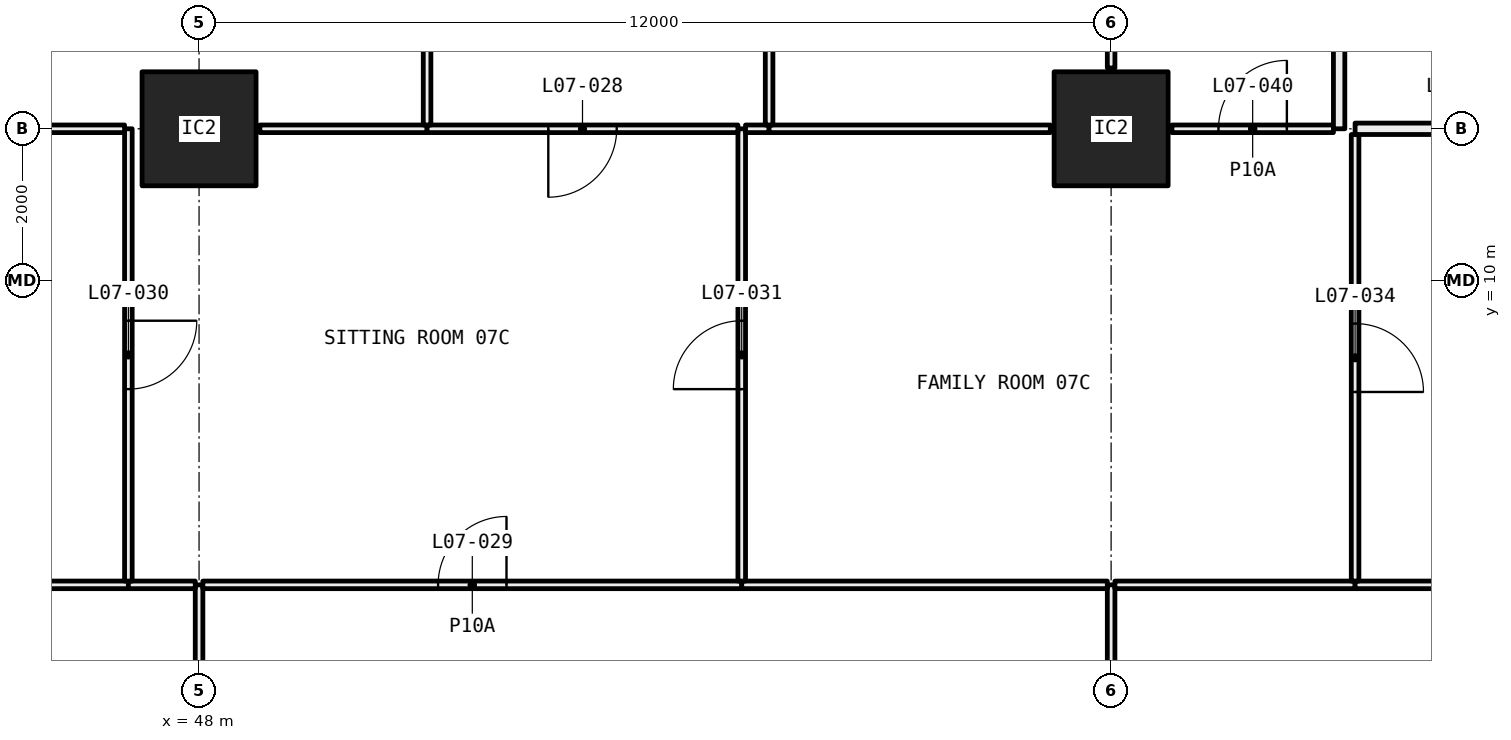
"""IFC4 building model, lengths in metres.
Left out: names, types, materials, properties, quantities, classifications, styles, units other than length and angle.
Written with IfcOpenShell. Run it as: python <this file> out.ifc"""

import sys

from ifc_helpers import new_model, si_unit, direction, frame, frame_2d, origin, origin_2d, place, context, subcontext, project, spatial, rectangle, hollow_rectangle, extrude, element, fill, save


model = new_model("IFC4")
c1 = context("Model", 3, precision=1e-05, world=origin(), true_north=direction((0.0, 1.0)))
c2 = subcontext(c1, "Body", "Model", "MODEL_VIEW")
j1 = project(units=[si_unit("LENGTHUNIT", "METRE"), si_unit("PLANEANGLEUNIT", "RADIAN")], contexts=[c1])
p1 = place(None, origin())
s1 = spatial("IfcSite", under=j1, at=p1, CompositionType="ELEMENT")
p2 = place(p1, origin())
s2 = spatial("IfcBuilding", under=s1, at=p2, CompositionType="ELEMENT")
p3 = place(p2, frame((0.0, 0.0, 36.9)))
s3 = spatial("IfcBuildingStorey", under=s2, at=p3, CompositionType="ELEMENT", Elevation=36.9)
for number, where, z_axis, x_axis in (
    (1, (48.0, 12.0, 0.0), (0.0, 0.0, 1.0), (1.0, 0.0, 0.0)),
    (2, (60.0, 12.0, 0.0), (0.0, 0.0, 1.0), (1.0, 0.0, 0.0)),
):
    element("IfcColumn", number, at=place(p3, frame(where, z_axis=z_axis, x_axis=x_axis)), inside=s3, PredefinedType="COLUMN", context=c2, shape_type="SweptSolid", body=[
        extrude(hollow_rectangle(XDim=1.5, YDim=1.5, WallThickness=0.065, at=origin_2d()), origin(), (0.0, 0.0, 1.0), 3.05),
    ])
p4 = place(p3, frame((48.0, 0.72, 0.0), z_axis=(0.0, 0.0, 1.0), x_axis=(0.0, 1.0, 0.0)))
e3 = element("IfcWall", 3, at=p4, inside=s3, PredefinedType="PARTITIONING", context=c2, shape_type="SweptSolid", body=[
    extrude(rectangle(XDim=5.28, YDim=0.1, at=frame_2d((2.64, 0.0))), origin(), (0.0, 0.0, 1.0), 2.45),
])
p5 = place(p4, frame((2.19, 0.0, 0.0)))
e4 = element("IfcOpeningElement", 4, at=p5, cuts=e3, PredefinedType="OPENING", context=c2, shape_type="SweptSolid", body=[
    extrude(rectangle(XDim=0.9, YDim=2.1, at=frame_2d((0.45, 1.05))), frame((0.0, 0.06, 0.0), z_axis=(0.0, -1.0, 0.0), x_axis=(1.0, 0.0, 0.0)), (0.0, 0.0, 1.0), 0.12),
])
p6 = place(p3, frame((47.07, 6.0, 0.0), z_axis=(0.0, 0.0, 1.0), x_axis=(-1.0, 0.0, 0.0)))
e5 = element("IfcWall", 5, at=p6, inside=s3, PredefinedType="PARTITIONING", context=c2, shape_type="SweptSolid", body=[
    extrude(rectangle(XDim=5.02, YDim=0.1, at=frame_2d((2.51, 0.0))), origin(), (0.0, 0.0, 1.0), 3.05),
])
p7 = place(p3, frame((47.95, 6.0, 0.0), z_axis=(0.0, 0.0, 1.0), x_axis=(-1.0, 0.0, 0.0)))
e6 = element("IfcWall", 6, at=p7, inside=s3, PredefinedType="PARTITIONING", context=c2, shape_type="SweptSolid", body=[
    extrude(rectangle(XDim=0.88, YDim=0.1, at=frame_2d((0.44, 0.0))), origin(), (0.0, 0.0, 1.0), 2.45),
])
p8 = place(p3, frame((60.0, 0.72, 0.0), z_axis=(0.0, 0.0, 1.0), x_axis=(0.0, 1.0, 0.0)))
e7 = element("IfcWall", 7, at=p8, inside=s3, PredefinedType="PARTITIONING", context=c2, shape_type="SweptSolid", body=[
    extrude(rectangle(XDim=5.28, YDim=0.1, at=frame_2d((2.64, 0.0))), origin(), (0.0, 0.0, 1.0), 2.45),
])
p9 = place(p8, frame((2.19, 0.0, 0.0)))
e8 = element("IfcOpeningElement", 8, at=p9, cuts=e7, PredefinedType="OPENING", context=c2, shape_type="SweptSolid", body=[
    extrude(rectangle(XDim=0.9, YDim=2.1, at=frame_2d((0.45, 1.05))), frame((0.0, 0.06, 0.0), z_axis=(0.0, -1.0, 0.0), x_axis=(1.0, 0.0, 0.0)), (0.0, 0.0, 1.0), 0.12),
])
p10 = place(p3, frame((55.14, 6.0, 0.0), z_axis=(0.0, 0.0, 1.0), x_axis=(-1.0, 0.0, 0.0)))
e9 = element("IfcWall", 9, at=p10, inside=s3, PredefinedType="PARTITIONING", context=c2, shape_type="SweptSolid", body=[
    extrude(rectangle(XDim=7.09, YDim=0.1, at=frame_2d((3.545, 0.0))), origin(), (0.0, 0.0, 1.0), 2.45),
])
p11 = place(p10, frame((3.095, 0.0, 0.0)))
e10 = element("IfcOpeningElement", 10, at=p11, cuts=e9, PredefinedType="OPENING", context=c2, shape_type="SweptSolid", body=[
    extrude(rectangle(XDim=0.9, YDim=2.1, at=frame_2d((0.45, 1.05))), frame((0.0, 0.06, 0.0), z_axis=(0.0, -1.0, 0.0), x_axis=(1.0, 0.0, 0.0)), (0.0, 0.0, 1.0), 0.12),
])
p12 = place(p3, frame((59.95, 6.0, 0.0), z_axis=(0.0, 0.0, 1.0), x_axis=(-1.0, 0.0, 0.0)))
e11 = element("IfcWall", 11, at=p12, inside=s3, PredefinedType="PARTITIONING", context=c2, shape_type="SweptSolid", body=[
    extrude(rectangle(XDim=4.81, YDim=0.1, at=frame_2d((2.405, 0.0))), origin(), (0.0, 0.0, 1.0), 2.45),
])
p13 = place(p3, frame((63.21, 6.0, 0.0), z_axis=(0.0, 0.0, 1.0), x_axis=(-1.0, 0.0, 0.0)))
e12 = element("IfcWall", 12, at=p13, inside=s3, PredefinedType="PARTITIONING", context=c2, shape_type="SweptSolid", body=[
    extrude(rectangle(XDim=3.16, YDim=0.1, at=frame_2d((1.58, 0.0))), origin(), (0.0, 0.0, 1.0), 2.45),
])
p14 = place(p3, frame((65.28, 6.0, 0.0), z_axis=(0.0, 0.0, 1.0), x_axis=(-1.0, 0.0, 0.0)))
e13 = element("IfcWall", 13, at=p14, inside=s3, PredefinedType="PARTITIONING", context=c2, shape_type="SweptSolid", body=[
    extrude(rectangle(XDim=2.07, YDim=0.1, at=frame_2d((1.035, 0.0))), origin(), (0.0, 0.0, 1.0), 3.05),
])
p15 = place(p3, frame((47.07, 6.05, 0.0), z_axis=(0.0, 0.0, 1.0), x_axis=(0.0, 1.0, 0.0)))
e14 = element("IfcWall", 14, at=p15, inside=s3, PredefinedType="PARTITIONING", context=c2, shape_type="SweptSolid", body=[
    extrude(rectangle(XDim=5.95, YDim=0.1, at=frame_2d((2.975, 0.0))), origin(), (0.0, 0.0, 1.0), 2.45),
])
p16 = place(p15, frame((2.525, 0.0, 0.0)))
e15 = element("IfcOpeningElement", 15, at=p16, cuts=e14, PredefinedType="OPENING", context=c2, shape_type="SweptSolid", body=[
    extrude(rectangle(XDim=0.9, YDim=2.1, at=frame_2d((0.45, 1.05))), frame((0.0, 0.06, 0.0), z_axis=(0.0, -1.0, 0.0), x_axis=(1.0, 0.0, 0.0)), (0.0, 0.0, 1.0), 0.12),
])
p17 = place(p3, frame((47.02, 12.0, 0.0), z_axis=(0.0, 0.0, 1.0), x_axis=(-1.0, 0.0, 0.0)))
e16 = element("IfcWall", 16, at=p17, inside=s3, PredefinedType="PARTITIONING", context=c2, shape_type="SweptSolid", body=[
    extrude(rectangle(XDim=3.52, YDim=0.1, at=frame_2d((1.76, 0.0))), origin(), (0.0, 0.0, 1.0), 2.45),
])
p18 = place(p3, frame((55.14, 6.05, 0.0), z_axis=(0.0, 0.0, 1.0), x_axis=(0.0, 1.0, 0.0)))
e17 = element("IfcWall", 17, at=p18, inside=s3, PredefinedType="PARTITIONING", context=c2, shape_type="SweptSolid", body=[
    extrude(rectangle(XDim=5.95, YDim=0.1, at=frame_2d((2.975, 0.0))), origin(), (0.0, 0.0, 1.0), 2.45),
])
p19 = place(p18, frame((2.525, 0.0, 0.0)))
e18 = element("IfcOpeningElement", 18, at=p19, cuts=e17, PredefinedType="OPENING", context=c2, shape_type="SweptSolid", body=[
    extrude(rectangle(XDim=0.9, YDim=2.1, at=frame_2d((0.45, 1.05))), frame((0.0, 0.06, 0.0), z_axis=(0.0, -1.0, 0.0), x_axis=(1.0, 0.0, 0.0)), (0.0, 0.0, 1.0), 0.12),
])
p20 = place(p3, frame((51.0, 12.0, 0.0), z_axis=(0.0, 0.0, 1.0), x_axis=(-1.0, 0.0, 0.0)))
e19 = element("IfcWall", 19, at=p20, inside=s3, PredefinedType="PARTITIONING", context=c2, shape_type="SweptSolid", body=[
    extrude(rectangle(XDim=2.2, YDim=0.1, at=frame_2d((1.1, 0.0))), origin(), (0.0, 0.0, 1.0), 2.45),
])
p21 = place(p3, frame((55.09, 12.0, 0.0), z_axis=(0.0, 0.0, 1.0), x_axis=(-1.0, 0.0, 0.0)))
e20 = element("IfcWall", 20, at=p21, inside=s3, PredefinedType="PARTITIONING", context=c2, shape_type="SweptSolid", body=[
    extrude(rectangle(XDim=4.09, YDim=0.1, at=frame_2d((2.045, 0.0))), origin(), (0.0, 0.0, 1.0), 2.45),
])
p22 = place(p21, frame((1.595, 0.0, 0.0)))
e21 = element("IfcOpeningElement", 21, at=p22, cuts=e20, PredefinedType="OPENING", context=c2, shape_type="SweptSolid", body=[
    extrude(rectangle(XDim=0.9, YDim=2.1, at=frame_2d((0.45, 1.05))), frame((0.0, 0.06, 0.0), z_axis=(0.0, -1.0, 0.0), x_axis=(1.0, 0.0, 0.0)), (0.0, 0.0, 1.0), 0.12),
])
p23 = place(p3, frame((63.21, 6.05, 0.0), z_axis=(0.0, 0.0, 1.0), x_axis=(0.0, 1.0, 0.0)))
e22 = element("IfcWall", 22, at=p23, inside=s3, PredefinedType="PARTITIONING", context=c2, shape_type="SweptSolid", body=[
    extrude(rectangle(XDim=5.875, YDim=0.1, at=frame_2d((2.938, 0.0))), origin(), (0.0, 0.0, 1.0), 2.45),
])
p24 = place(p23, frame((2.488, 0.0, 0.0)))
e23 = element("IfcOpeningElement", 23, at=p24, cuts=e22, PredefinedType="OPENING", context=c2, shape_type="SweptSolid", body=[
    extrude(rectangle(XDim=0.9, YDim=2.1, at=frame_2d((0.45, 1.05))), frame((0.0, 0.06, 0.0), z_axis=(0.0, -1.0, 0.0), x_axis=(1.0, 0.0, 0.0)), (0.0, 0.0, 1.0), 0.12),
])
p25 = place(p3, frame((55.5, 12.0, 0.0), z_axis=(0.0, 0.0, 1.0), x_axis=(-1.0, 0.0, 0.0)))
e24 = element("IfcWall", 24, at=p25, inside=s3, PredefinedType="PARTITIONING", context=c2, shape_type="SweptSolid", body=[
    extrude(rectangle(XDim=0.31, YDim=0.1, at=frame_2d((0.155, 0.0))), origin(), (0.0, 0.0, 1.0), 2.45),
])
p26 = place(p3, frame((59.2, 12.0, 0.0), z_axis=(0.0, 0.0, 1.0), x_axis=(-1.0, 0.0, 0.0)))
e25 = element("IfcWall", 25, at=p26, inside=s3, PredefinedType="PARTITIONING", context=c2, shape_type="SweptSolid", body=[
    extrude(rectangle(XDim=3.7, YDim=0.1, at=frame_2d((1.85, 0.0))), origin(), (0.0, 0.0, 1.0), 2.45),
])
p27 = place(p3, frame((62.925, 12.0, 0.0), z_axis=(0.0, 0.0, 1.0), x_axis=(-1.0, 0.0, 0.0)))
e26 = element("IfcWall", 26, at=p27, inside=s3, PredefinedType="PARTITIONING", context=c2, shape_type="SweptSolid", body=[
    extrude(rectangle(XDim=2.125, YDim=0.1, at=frame_2d((1.062, 0.0))), origin(), (0.0, 0.0, 1.0), 2.45),
])
p28 = place(p27, frame((0.613, 0.0, 0.0)))
e27 = element("IfcOpeningElement", 27, at=p28, cuts=e26, PredefinedType="OPENING", context=c2, shape_type="SweptSolid", body=[
    extrude(rectangle(XDim=0.9, YDim=2.1, at=frame_2d((0.45, 1.05))), frame((0.0, 0.06, 0.0), z_axis=(0.0, -1.0, 0.0), x_axis=(1.0, 0.0, 0.0)), (0.0, 0.0, 1.0), 0.12),
])
p29 = place(p3, frame((66.146, 12.0, 0.0), z_axis=(0.0, 0.0, 1.0), x_axis=(-1.0, 0.0, 0.0)))
e28 = element("IfcWall", 28, at=p29, inside=s3, PredefinedType="PARTITIONING", context=c2, shape_type="SweptSolid", body=[
    extrude(rectangle(XDim=2.936, YDim=0.15, at=frame_2d((1.468, 0.0))), origin(), (0.0, 0.0, 1.0), 2.45),
])
p30 = place(p29, frame((1.018, 0.0, 0.0)))
e29 = element("IfcOpeningElement", 29, at=p30, cuts=e28, PredefinedType="OPENING", context=c2, shape_type="SweptSolid", body=[
    extrude(rectangle(XDim=0.9, YDim=2.1, at=frame_2d((0.45, 1.05))), frame((0.0, 0.085, 0.0), z_axis=(0.0, -1.0, 0.0), x_axis=(1.0, 0.0, 0.0)), (0.0, 0.0, 1.0), 0.17),
])
p31 = place(p3, frame((51.0, 12.05, 0.0), z_axis=(0.0, 0.0, 1.0), x_axis=(0.0, 1.0, 0.0)))
e30 = element("IfcWall", 30, at=p31, inside=s3, PredefinedType="PARTITIONING", context=c2, shape_type="SweptSolid", body=[
    extrude(rectangle(XDim=5.85, YDim=0.1, at=frame_2d((2.925, 0.0))), origin(), (0.0, 0.0, 1.0), 2.45),
])
p32 = place(p31, frame((2.475, 0.0, 0.0)))
e31 = element("IfcOpeningElement", 31, at=p32, cuts=e30, PredefinedType="OPENING", context=c2, shape_type="SweptSolid", body=[
    extrude(rectangle(XDim=0.9, YDim=2.1, at=frame_2d((0.45, 1.05))), frame((0.0, 0.06, 0.0), z_axis=(0.0, -1.0, 0.0), x_axis=(1.0, 0.0, 0.0)), (0.0, 0.0, 1.0), 0.12),
])
p33 = place(p3, frame((55.5, 12.05, 0.0), z_axis=(0.0, 0.0, 1.0), x_axis=(0.0, 1.0, 0.0)))
e32 = element("IfcWall", 32, at=p33, inside=s3, PredefinedType="PARTITIONING", context=c2, shape_type="SweptSolid", body=[
    extrude(rectangle(XDim=5.85, YDim=0.1, at=frame_2d((2.925, 0.0))), origin(), (0.0, 0.0, 1.0), 2.45),
])
p34 = place(p33, frame((2.475, 0.0, 0.0)))
e33 = element("IfcOpeningElement", 33, at=p34, cuts=e32, PredefinedType="OPENING", context=c2, shape_type="SweptSolid", body=[
    extrude(rectangle(XDim=0.9, YDim=2.1, at=frame_2d((0.45, 1.05))), frame((0.0, 0.06, 0.0), z_axis=(0.0, -1.0, 0.0), x_axis=(1.0, 0.0, 0.0)), (0.0, 0.0, 1.0), 0.12),
])
p35 = place(p3, frame((60.0, 12.8, 0.0), z_axis=(0.0, 0.0, 1.0), x_axis=(0.0, 1.0, 0.0)))
e34 = element("IfcWall", 34, at=p35, inside=s3, PredefinedType="PARTITIONING", context=c2, shape_type="SweptSolid", body=[
    extrude(rectangle(XDim=5.1, YDim=0.1, at=frame_2d((2.55, 0.0))), origin(), (0.0, 0.0, 1.0), 3.05),
])
p36 = place(p3, frame((63.0, 12.0, 0.0), z_axis=(0.0, 0.0, 1.0), x_axis=(0.0, 1.0, 0.0)))
e35 = element("IfcWall", 35, at=p36, inside=s3, PredefinedType="PARTITIONING", context=c2, shape_type="SweptSolid", body=[
    extrude(rectangle(XDim=3.814, YDim=0.15, at=frame_2d((1.907, 0.0))), origin(), (0.0, 0.0, 1.0), 2.45),
])
p37 = place(p22, origin())
e36 = element("IfcDoor", 36, at=p37, inside=s3, OperationType="SINGLE_SWING_LEFT", PredefinedType="DOOR", context=c2, shape_type="SweptSolid", body=[
    extrude(rectangle(XDim=0.9, YDim=2.1, at=frame_2d((0.45, 1.05))), frame((0.0, 0.025, 0.0), z_axis=(0.0, -1.0, 0.0), x_axis=(1.0, 0.0, 0.0)), (0.0, 0.0, 1.0), 0.05),
])
fill(e21, e36)
p38 = place(p11, frame((0.9, 0.0, 0.0), x_axis=(-1.0, 0.0, 0.0)))
e37 = element("IfcDoor", 37, at=p38, inside=s3, OperationType="SINGLE_SWING_LEFT", PredefinedType="DOOR", context=c2, shape_type="SweptSolid", body=[
    extrude(rectangle(XDim=0.9, YDim=2.1, at=frame_2d((0.45, 1.05))), frame((0.0, 0.025, 0.0), z_axis=(0.0, -1.0, 0.0), x_axis=(1.0, 0.0, 0.0)), (0.0, 0.0, 1.0), 0.05),
])
fill(e10, e37)
p39 = place(p16, frame((0.9, 0.0, 0.0), x_axis=(-1.0, 0.0, 0.0)))
e38 = element("IfcDoor", 38, at=p39, inside=s3, OperationType="SINGLE_SWING_RIGHT", PredefinedType="DOOR", context=c2, shape_type="SweptSolid", body=[
    extrude(rectangle(XDim=0.9, YDim=2.1, at=frame_2d((0.45, 1.05))), frame((0.0, 0.025, 0.0), z_axis=(0.0, -1.0, 0.0), x_axis=(1.0, 0.0, 0.0)), (0.0, 0.0, 1.0), 0.05),
])
fill(e15, e38)
p40 = place(p19, origin())
e39 = element("IfcDoor", 39, at=p40, inside=s3, OperationType="SINGLE_SWING_RIGHT", PredefinedType="DOOR", context=c2, shape_type="SweptSolid", body=[
    extrude(rectangle(XDim=0.9, YDim=2.1, at=frame_2d((0.45, 1.05))), frame((0.0, 0.025, 0.0), z_axis=(0.0, -1.0, 0.0), x_axis=(1.0, 0.0, 0.0)), (0.0, 0.0, 1.0), 0.05),
])
fill(e18, e39)
p41 = place(p24, frame((0.9, 0.0, 0.0), x_axis=(-1.0, 0.0, 0.0)))
e40 = element("IfcDoor", 40, at=p41, inside=s3, OperationType="SINGLE_SWING_LEFT", PredefinedType="DOOR", context=c2, shape_type="SweptSolid", body=[
    extrude(rectangle(XDim=0.9, YDim=2.1, at=frame_2d((0.45, 1.05))), frame((0.0, 0.025, 0.0), z_axis=(0.0, -1.0, 0.0), x_axis=(1.0, 0.0, 0.0)), (0.0, 0.0, 1.0), 0.05),
])
fill(e23, e40)
p42 = place(p28, frame((0.9, 0.0, 0.0), x_axis=(-1.0, 0.0, 0.0)))
e41 = element("IfcDoor", 41, at=p42, inside=s3, OperationType="SINGLE_SWING_LEFT", PredefinedType="DOOR", context=c2, shape_type="SweptSolid", body=[
    extrude(rectangle(XDim=0.9, YDim=2.1, at=frame_2d((0.45, 1.05))), frame((0.0, 0.025, 0.0), z_axis=(0.0, -1.0, 0.0), x_axis=(1.0, 0.0, 0.0)), (0.0, 0.0, 1.0), 0.05),
])
fill(e27, e41)
save(model, sys.argv[1])
